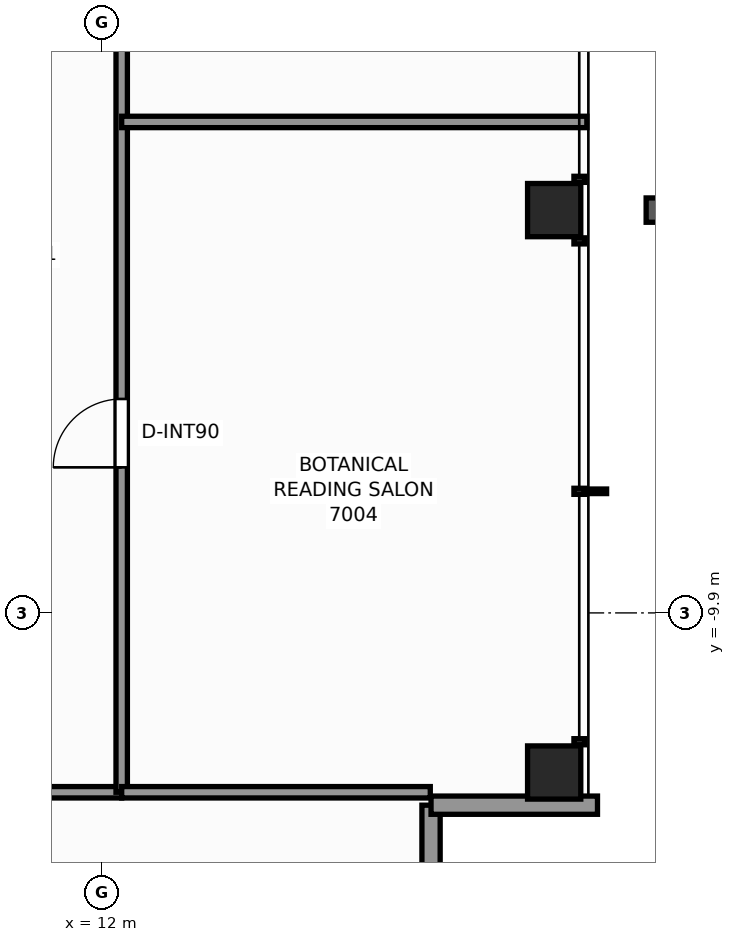
"""IFC4 building model, lengths in metres.
Left out: names, types, materials, properties, quantities, classifications, styles, units other than length and angle.
Written with IfcOpenShell. Run it as: python <this file> out.ifc"""

import sys

from ifc_helpers import new_model, si_unit, direction, frame, frame_2d, origin, origin_2d, place, context, subcontext, project, spatial, rectangle, extrude, element, fill, save


model = new_model("IFC4")
c1 = context("Model", 3, precision=1e-05, world=origin(), true_north=direction((0.0, 1.0)))
c2 = subcontext(c1, "Body", "Model", "MODEL_VIEW")
j1 = project(units=[si_unit("LENGTHUNIT", "METRE"), si_unit("PLANEANGLEUNIT", "RADIAN")], contexts=[c1])
p1 = place(None, origin())
s1 = spatial("IfcSite", under=j1, at=p1, CompositionType="ELEMENT")
p2 = place(p1, origin())
s2 = spatial("IfcBuilding", under=s1, at=p2, CompositionType="ELEMENT")
p3 = place(p2, frame((0.0, 0.0, 240.9)))
s3 = spatial("IfcBuildingStorey", under=s2, at=p3, CompositionType="ELEMENT", Elevation=240.9)
for number, where, z_axis, x_axis in (
    (1, (17.95, -12.0, 0.0), (0.0, 0.0, 1.0), (1.0, 0.0, 0.0)),
    (2, (17.95, -4.6, 0.0), (0.0, 0.0, 1.0), (1.0, 0.0, 0.0)),
):
    element("IfcColumn", number, at=place(p3, frame(where, z_axis=z_axis, x_axis=x_axis)), inside=s3, PredefinedType="COLUMN", context=c2, shape_type="SweptSolid", body=[
        extrude(rectangle(XDim=0.7, YDim=0.7, at=origin_2d()), origin(), (0.0, 0.0, 1.0), 3.5),
    ])
p4 = place(p3, frame((16.33, -12.43, 0.0), z_axis=(0.0, 0.0, 1.0), x_axis=(0.0, -1.0, 0.0)))
e3 = element("IfcWall", 3, at=p4, inside=s3, PredefinedType="STANDARD", context=c2, shape_type="SweptSolid", body=[
    extrude(rectangle(XDim=2.19, YDim=0.24, at=frame_2d((1.095, 0.0))), origin(), (0.0, 0.0, 1.0), 2.633),
])
p5 = place(p3, frame((18.52, -12.43, 0.0), z_axis=(0.0, 0.0, 1.0), x_axis=(-1.0, 0.0, 0.0)))
e4 = element("IfcWall", 4, at=p5, inside=s3, PredefinedType="STANDARD", context=c2, shape_type="SweptSolid", body=[
    extrude(rectangle(XDim=2.19, YDim=0.24, at=frame_2d((1.095, 0.0))), origin(), (0.0, 0.0, 1.0), 2.633),
])
p6 = place(p3, frame((-12.58, -12.26, 0.0), z_axis=(0.0, 0.0, 1.0), x_axis=(1.0, 0.0, 0.0)))
e5 = element("IfcWall", 5, at=p6, inside=s3, PredefinedType="PARTITIONING", context=c2, shape_type="SweptSolid", body=[
    extrude(rectangle(XDim=24.84, YDim=0.15, at=frame_2d((12.42, 0.0))), origin(), (0.0, 0.0, 1.0), 2.539),
])
p7 = place(p6, frame((4.398, 0.0, 0.0)))
e6 = element("IfcOpeningElement", 6, at=p7, cuts=e5, PredefinedType="OPENING", context=c2, shape_type="SweptSolid", body=[
    extrude(rectangle(XDim=0.9, YDim=2.06, at=frame_2d((0.45, 1.03))), frame((0.0, 0.085, 0.0), z_axis=(0.0, -1.0, 0.0), x_axis=(1.0, 0.0, 0.0)), (0.0, 0.0, 1.0), 0.17),
])
p8 = place(p6, frame((8.99, 0.0, 0.0)))
e7 = element("IfcOpeningElement", 7, at=p8, cuts=e5, PredefinedType="OPENING", context=c2, shape_type="SweptSolid", body=[
    extrude(rectangle(XDim=0.9, YDim=2.06, at=frame_2d((0.45, 1.03))), frame((0.0, 0.085, 0.0), z_axis=(0.0, -1.0, 0.0), x_axis=(1.0, 0.0, 0.0)), (0.0, 0.0, 1.0), 0.17),
])
p9 = place(p6, frame((13.129, 0.0, 0.0)))
e8 = element("IfcOpeningElement", 8, at=p9, cuts=e5, PredefinedType="OPENING", context=c2, shape_type="SweptSolid", body=[
    extrude(rectangle(XDim=0.95, YDim=2.06, at=frame_2d((0.475, 1.03))), frame((0.0, 0.085, 0.0), z_axis=(0.0, -1.0, 0.0), x_axis=(1.0, 0.0, 0.0)), (0.0, 0.0, 1.0), 0.17),
])
p10 = place(p6, frame((18.402, 0.0, 0.0)))
e9 = element("IfcOpeningElement", 9, at=p10, cuts=e5, PredefinedType="OPENING", context=c2, shape_type="SweptSolid", body=[
    extrude(rectangle(XDim=0.9, YDim=2.06, at=frame_2d((0.45, 1.03))), frame((0.0, 0.085, 0.0), z_axis=(0.0, -1.0, 0.0), x_axis=(1.0, 0.0, 0.0)), (0.0, 0.0, 1.0), 0.17),
])
p11 = place(p6, frame((20.737, 0.0, 0.0)))
e10 = element("IfcOpeningElement", 10, at=p11, cuts=e5, PredefinedType="OPENING", context=c2, shape_type="SweptSolid", body=[
    extrude(rectangle(XDim=0.9, YDim=2.06, at=frame_2d((0.45, 1.03))), frame((0.0, 0.085, 0.0), z_axis=(0.0, -1.0, 0.0), x_axis=(1.0, 0.0, 0.0)), (0.0, 0.0, 1.0), 0.17),
])
p12 = place(p3, frame((12.26, -12.26, 0.0), z_axis=(0.0, 0.0, 1.0), x_axis=(0.0, 1.0, 0.0)))
e11 = element("IfcWall", 11, at=p12, inside=s3, PredefinedType="PARTITIONING", context=c2, shape_type="SweptSolid", body=[
    extrude(rectangle(XDim=24.84, YDim=0.15, at=frame_2d((12.42, 0.0))), origin(), (0.0, 0.0, 1.0), 2.539),
])
p13 = place(p12, frame((4.275, 0.0, 0.0)))
e12 = element("IfcOpeningElement", 12, at=p13, cuts=e11, PredefinedType="OPENING", context=c2, shape_type="SweptSolid", body=[
    extrude(rectangle(XDim=0.9, YDim=2.06, at=frame_2d((0.45, 1.03))), frame((0.0, 0.085, 0.0), z_axis=(0.0, -1.0, 0.0), x_axis=(1.0, 0.0, 0.0)), (0.0, 0.0, 1.0), 0.17),
])
p14 = place(p12, frame((9.966, 0.0, 0.0)))
e13 = element("IfcOpeningElement", 13, at=p14, cuts=e11, PredefinedType="OPENING", context=c2, shape_type="SweptSolid", body=[
    extrude(rectangle(XDim=0.95, YDim=2.06, at=frame_2d((0.475, 1.03))), frame((0.0, 0.085, 0.0), z_axis=(0.0, -1.0, 0.0), x_axis=(1.0, 0.0, 0.0)), (0.0, 0.0, 1.0), 0.17),
])
p15 = place(p12, frame((18.653, 0.0, 0.0)))
e14 = element("IfcOpeningElement", 14, at=p15, cuts=e11, PredefinedType="OPENING", context=c2, shape_type="SweptSolid", body=[
    extrude(rectangle(XDim=0.95, YDim=2.06, at=frame_2d((0.475, 1.03))), frame((0.0, 0.085, 0.0), z_axis=(0.0, -1.0, 0.0), x_axis=(1.0, 0.0, 0.0)), (0.0, 0.0, 1.0), 0.17),
])
p16 = place(p12, frame((20.836, 0.0, 0.0)))
e15 = element("IfcOpeningElement", 15, at=p16, cuts=e11, PredefinedType="OPENING", context=c2, shape_type="SweptSolid", body=[
    extrude(rectangle(XDim=0.9, YDim=2.06, at=frame_2d((0.45, 1.03))), frame((0.0, 0.085, 0.0), z_axis=(0.0, -1.0, 0.0), x_axis=(1.0, 0.0, 0.0)), (0.0, 0.0, 1.0), 0.17),
])
p17 = place(p3, frame((12.26, -12.26, 0.0), z_axis=(0.0, 0.0, 1.0), x_axis=(1.0, 0.0, 0.0)))
e16 = element("IfcWall", 16, at=p17, inside=s3, PredefinedType="PARTITIONING", context=c2, shape_type="SweptSolid", body=[
    extrude(rectangle(XDim=4.06, YDim=0.15, at=frame_2d((2.03, 0.0))), origin(), (0.0, 0.0, 1.0), 3.25),
])
p18 = place(p3, frame((12.26, -3.44, 0.0), z_axis=(0.0, 0.0, 1.0), x_axis=(1.0, 0.0, 0.0)))
e17 = element("IfcWall", 17, at=p18, inside=s3, PredefinedType="PARTITIONING", context=c2, shape_type="SweptSolid", body=[
    extrude(rectangle(XDim=6.12, YDim=0.15, at=frame_2d((3.06, 0.0))), origin(), (0.0, 0.0, 1.0), 2.623),
])
p19 = place(p13, origin())
e18 = element("IfcDoor", 18, at=p19, inside=s3, OperationType="SINGLE_SWING_LEFT", PredefinedType="DOOR", context=c2, shape_type="SweptSolid", body=[
    extrude(rectangle(XDim=0.9, YDim=2.06, at=frame_2d((0.45, 1.03))), frame((0.0, 0.025, 0.0), z_axis=(0.0, -1.0, 0.0), x_axis=(1.0, 0.0, 0.0)), (0.0, 0.0, 1.0), 0.05),
])
fill(e12, e18)
save(model, sys.argv[1])
